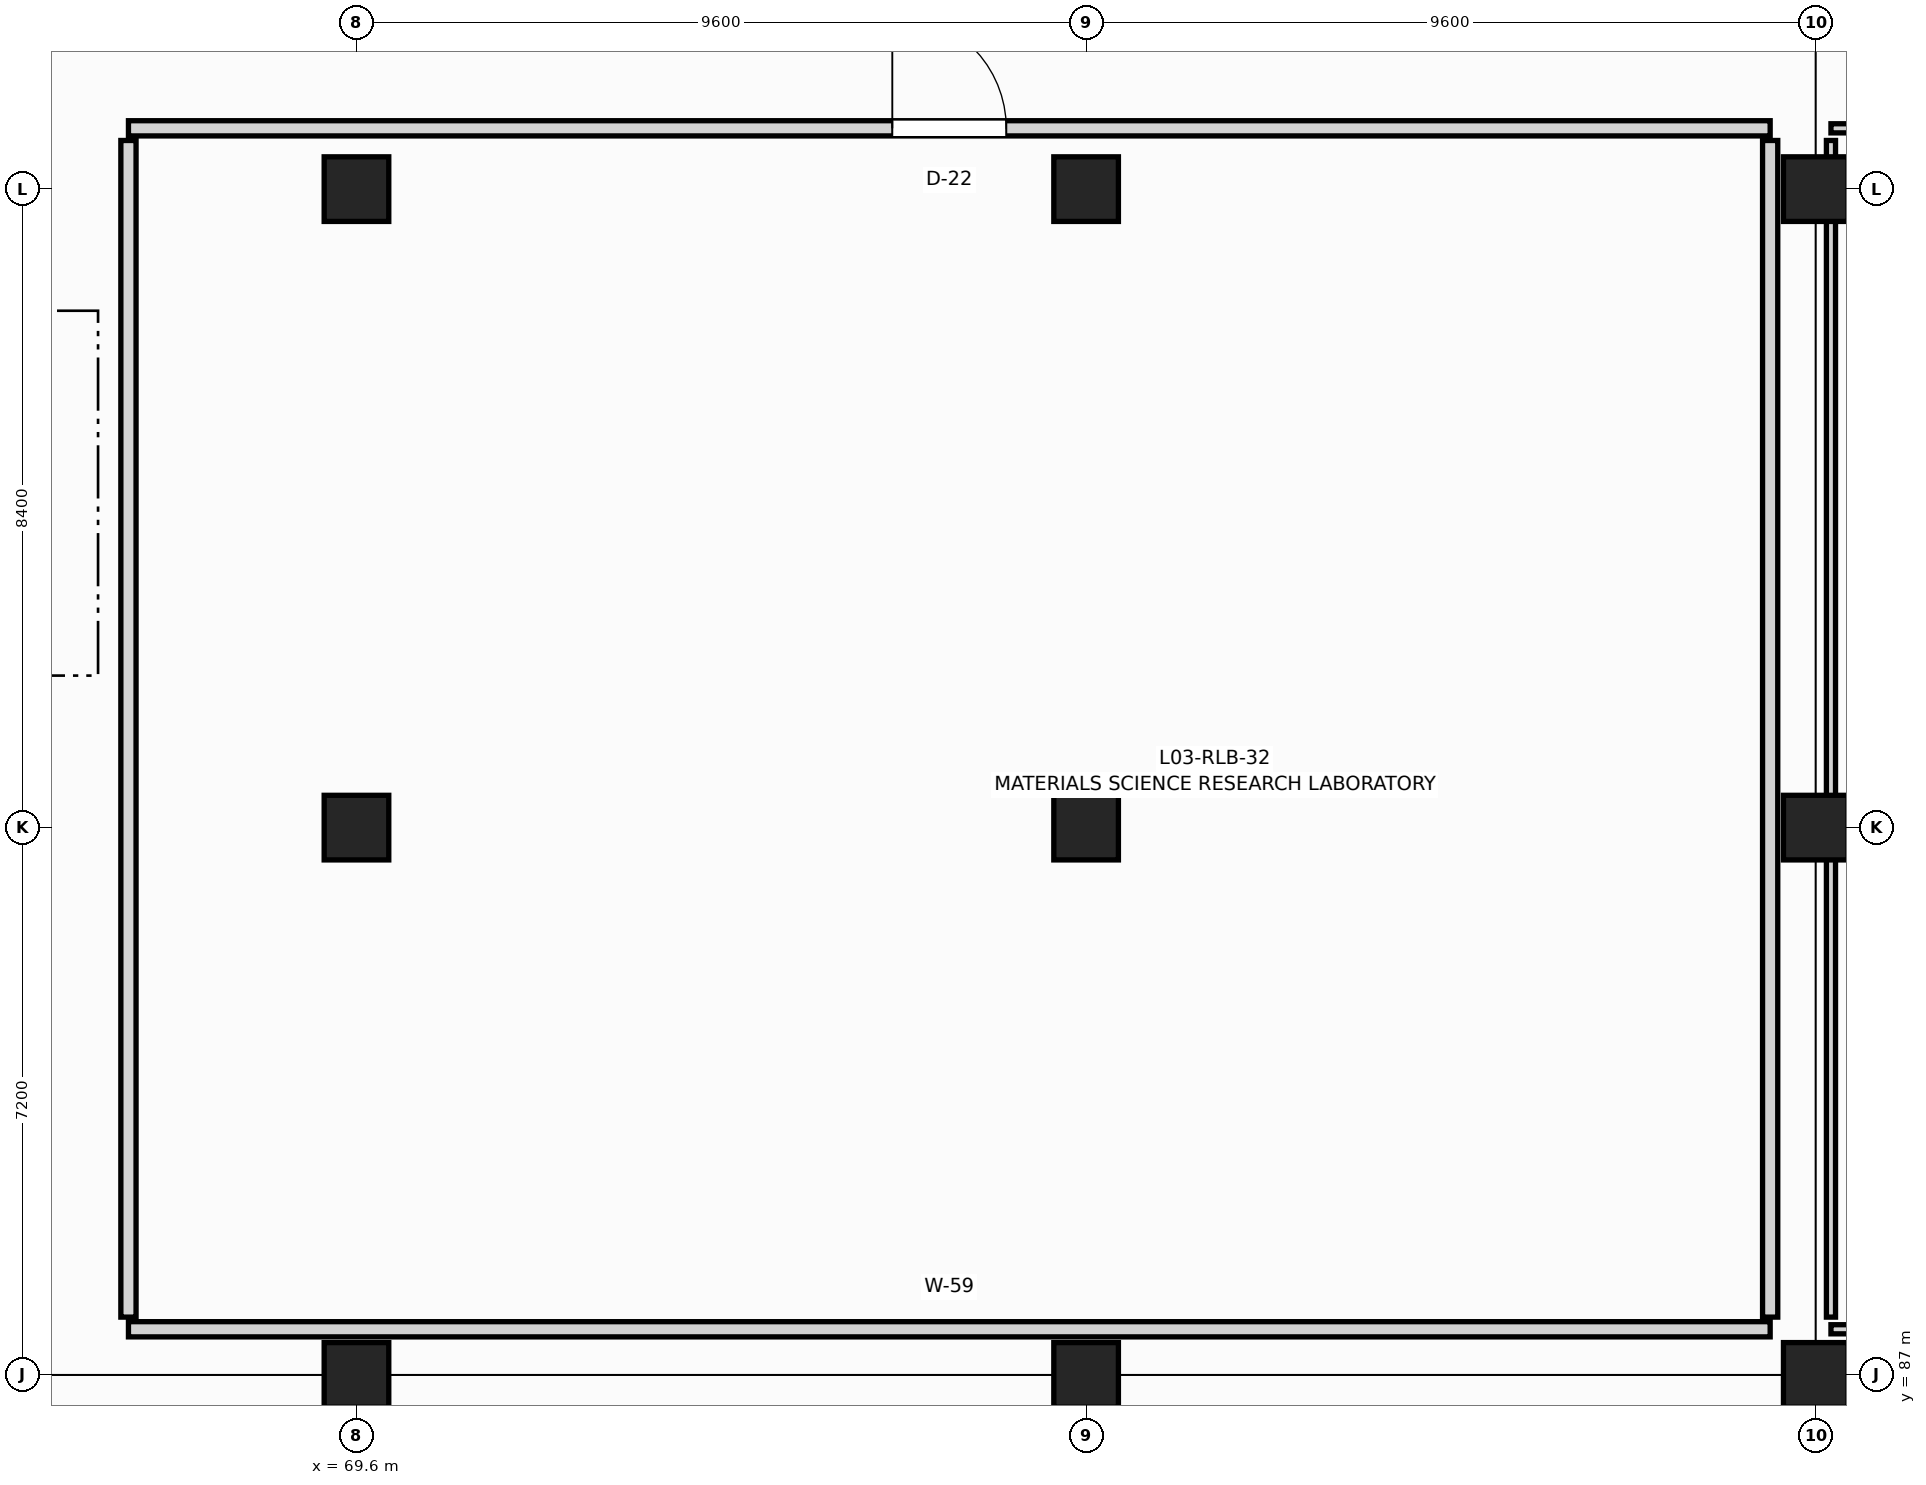
"""IFC4 building model, lengths in metres.
Left out: names, types, materials, properties, quantities, classifications, styles, units other than length and angle.
Written with IfcOpenShell. Run it as: python <this file> out.ifc"""

import sys

from ifc_helpers import new_model, si_unit, direction, frame, frame_2d, origin, origin_2d, place, context, subcontext, project, spatial, rectangle, extrude, element, fill, save


model = new_model("IFC4")
c1 = context("Model", 3, precision=1e-05, world=origin(), true_north=direction((0.0, 1.0)))
c2 = subcontext(c1, "Body", "Model", "MODEL_VIEW")
j1 = project(units=[si_unit("LENGTHUNIT", "METRE"), si_unit("PLANEANGLEUNIT", "RADIAN")], contexts=[c1])
p1 = place(None, origin())
s1 = spatial("IfcSite", under=j1, at=p1, CompositionType="ELEMENT")
p2 = place(p1, origin())
s2 = spatial("IfcBuilding", under=s1, at=p2, CompositionType="ELEMENT")
p3 = place(p2, frame((0.0, 0.0, 14.1)))
s3 = spatial("IfcBuildingStorey", under=s2, at=p3, CompositionType="ELEMENT", Elevation=14.1)
for number, where, z_axis, x_axis in (
    (1, (69.6, 87.0, 0.0), (0.0, 0.0, 1.0), (1.0, 0.0, 0.0)),
    (2, (69.6, 94.2, 0.0), (0.0, 0.0, 1.0), (1.0, 0.0, 0.0)),
    (3, (69.6, 102.6, 0.0), (0.0, 0.0, 1.0), (1.0, 0.0, 0.0)),
    (4, (79.2, 87.0, 0.0), (0.0, 0.0, 1.0), (1.0, 0.0, 0.0)),
    (5, (79.2, 94.2, 0.0), (0.0, 0.0, 1.0), (1.0, 0.0, 0.0)),
    (6, (79.2, 102.6, 0.0), (0.0, 0.0, 1.0), (1.0, 0.0, 0.0)),
    (7, (88.8, 87.0, 0.0), (0.0, 0.0, 1.0), (1.0, 0.0, 0.0)),
    (8, (88.8, 94.2, 0.0), (0.0, 0.0, 1.0), (1.0, 0.0, 0.0)),
    (9, (88.8, 102.6, 0.0), (0.0, 0.0, 1.0), (1.0, 0.0, 0.0)),
):
    element("IfcColumn", number, at=place(p3, frame(where, z_axis=z_axis, x_axis=x_axis)), inside=s3, PredefinedType="COLUMN", context=c2, shape_type="SweptSolid", body=[
        extrude(rectangle(XDim=0.85, YDim=0.85, at=origin_2d()), origin(), (0.0, 0.0, 1.0), 3.9),
    ])
p4 = place(p3, frame((66.6, 87.6, 0.0), z_axis=(0.0, 0.0, 1.0), x_axis=(1.0, 0.0, 0.0)))
e10 = element("IfcWall", 10, at=p4, inside=s3, PredefinedType="PARTITIONING", context=c2, shape_type="SweptSolid", body=[
    extrude(rectangle(XDim=21.6, YDim=0.2, at=frame_2d((10.8, 0.0))), origin(), (0.0, 0.0, 1.0), 3.15),
])
p5 = place(p3, frame((66.6, 103.4, 0.0), z_axis=(0.0, 0.0, 1.0), x_axis=(1.0, 0.0, 0.0)))
e11 = element("IfcWall", 11, at=p5, inside=s3, PredefinedType="PARTITIONING", context=c2, shape_type="SweptSolid", body=[
    extrude(rectangle(XDim=21.6, YDim=0.2, at=frame_2d((10.8, 0.0))), origin(), (0.0, 0.0, 1.0), 3.15),
])
p6 = place(p5, frame((10.05, 0.0, 0.0)))
e12 = element("IfcOpeningElement", 12, at=p6, cuts=e11, PredefinedType="OPENING", context=c2, shape_type="SweptSolid", body=[
    extrude(rectangle(XDim=1.5, YDim=2.2, at=frame_2d((0.75, 1.1))), frame((0.0, 0.11, 0.0), z_axis=(0.0, -1.0, 0.0), x_axis=(1.0, 0.0, 0.0)), (0.0, 0.0, 1.0), 0.22),
])
for number, where, z_axis, x_axis in (
    (13, (66.6, 87.76, 0.0), (0.0, 0.0, 1.0), (0.0, 1.0, 0.0)),
    (14, (88.2, 87.76, 0.0), (0.0, 0.0, 1.0), (0.0, 1.0, 0.0)),
):
    element("IfcWall", number, at=place(p3, frame(where, z_axis=z_axis, x_axis=x_axis)), inside=s3, PredefinedType="PARTITIONING", context=c2, shape_type="SweptSolid", body=[
        extrude(rectangle(XDim=15.48, YDim=0.2, at=frame_2d((7.74, 0.0))), origin(), (0.0, 0.0, 1.0), 3.15),
    ])
p7 = place(p3, frame((89.0, 87.6, 0.0), z_axis=(0.0, 0.0, 1.0), x_axis=(1.0, 0.0, 0.0)))
e15 = element("IfcWall", 15, at=p7, inside=s3, PredefinedType="PARTITIONING", context=c2, shape_type="SweptSolid", body=[
    extrude(rectangle(XDim=27.8, YDim=0.12, at=frame_2d((13.9, 0.0))), origin(), (0.0, 0.0, 1.0), 3.15),
])
p8 = place(p3, frame((89.0, 103.4, 0.0), z_axis=(0.0, 0.0, 1.0), x_axis=(1.0, 0.0, 0.0)))
e16 = element("IfcWall", 16, at=p8, inside=s3, PredefinedType="PARTITIONING", context=c2, shape_type="SweptSolid", body=[
    extrude(rectangle(XDim=27.8, YDim=0.12, at=frame_2d((13.9, 0.0))), origin(), (0.0, 0.0, 1.0), 3.15),
])
p9 = place(p8, frame((13.425, 0.0, 0.0)))
e17 = element("IfcOpeningElement", 17, at=p9, cuts=e16, PredefinedType="OPENING", context=c2, shape_type="SweptSolid", body=[
    extrude(rectangle(XDim=0.95, YDim=2.15, at=frame_2d((0.475, 1.075))), frame((0.0, 0.07, 0.0), z_axis=(0.0, -1.0, 0.0), x_axis=(1.0, 0.0, 0.0)), (0.0, 0.0, 1.0), 0.14),
])
p10 = place(p3, frame((89.0, 87.76, 0.0), z_axis=(0.0, 0.0, 1.0), x_axis=(0.0, 1.0, 0.0)))
e18 = element("IfcWall", 18, at=p10, inside=s3, PredefinedType="PARTITIONING", context=c2, shape_type="SweptSolid", body=[
    extrude(rectangle(XDim=15.48, YDim=0.12, at=frame_2d((7.74, 0.0))), origin(), (0.0, 0.0, 1.0), 3.15),
])
p11 = place(p6, origin())
e19 = element("IfcDoor", 19, at=p11, inside=s3, OperationType="SINGLE_SWING_LEFT", PredefinedType="DOOR", context=c2, shape_type="SweptSolid", body=[
    extrude(rectangle(XDim=1.5, YDim=2.2, at=frame_2d((0.75, 1.1))), frame((0.0, 0.025, 0.0), z_axis=(0.0, -1.0, 0.0), x_axis=(1.0, 0.0, 0.0)), (0.0, 0.0, 1.0), 0.05),
])
fill(e12, e19)
save(model, sys.argv[1])
